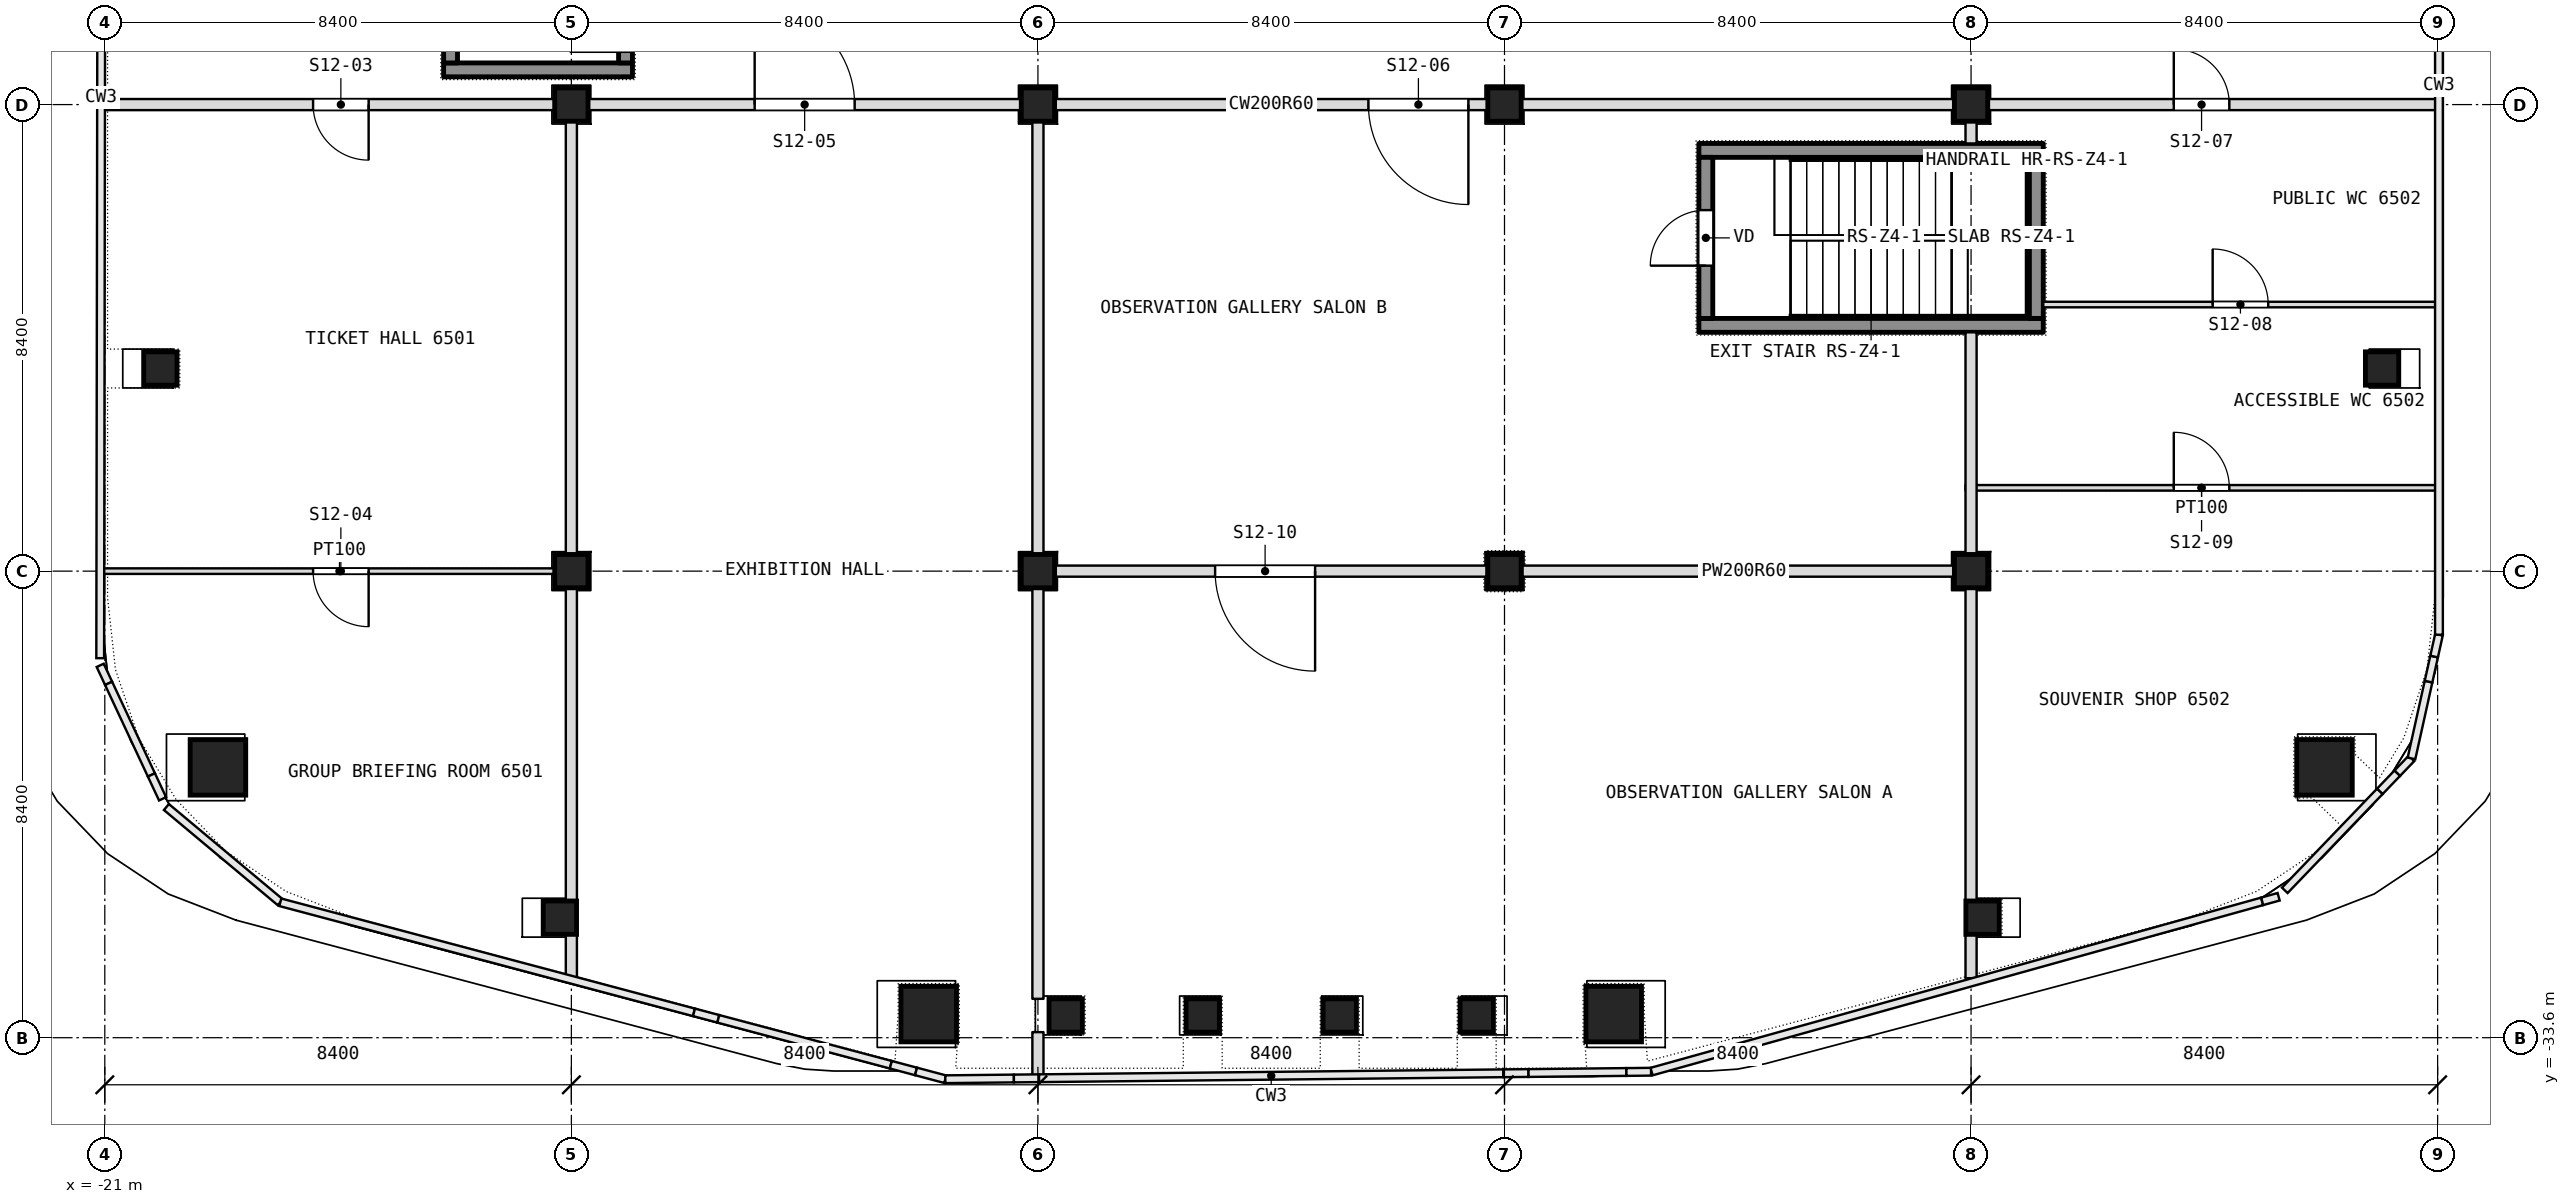
"""IFC4 building model, lengths in metres.
Left out: names, types, materials, properties, quantities, classifications, styles, units other than length and angle.
Written with IfcOpenShell. Run it as: python <this file> out.ifc"""

import sys

from ifc_helpers import new_model, si_unit, direction, frame, frame_2d, origin, origin_2d, place, context, subcontext, project, spatial, rectangle, extrude, element, fill, save


model = new_model("IFC4")
c1 = context("Model", 3, precision=1e-05, world=origin(), true_north=direction((0.0, 1.0)))
c2 = subcontext(c1, "Body", "Model", "MODEL_VIEW")
j1 = project(units=[si_unit("LENGTHUNIT", "METRE"), si_unit("PLANEANGLEUNIT", "RADIAN")], contexts=[c1])
p1 = place(None, origin())
s1 = spatial("IfcSite", under=j1, at=p1, CompositionType="ELEMENT")
p2 = place(p1, origin())
s2 = spatial("IfcBuilding", under=s1, at=p2, CompositionType="ELEMENT")
p3 = place(p2, frame((0.0, 0.0, 281.3)))
s3 = spatial("IfcBuildingStorey", under=s2, at=p3, CompositionType="ELEMENT", Elevation=281.3)
for number, where, z_axis, x_axis in (
    (1, (-18.963, -28.733, 0.0), (0.0, 0.0, 1.0), (1.0, 0.0, 0.0)),
    (2, (-6.166, -33.175, 0.0), (0.0, 0.0, 1.0), (1.0, 0.0, 0.0)),
    (3, (6.166, -33.175, 0.0), (0.0, 0.0, 1.0), (1.0, 0.0, 0.0)),
    (4, (18.963, -28.733, 0.0), (0.0, 0.0, 1.0), (1.0, 0.0, 0.0)),
):
    element("IfcColumn", number, at=place(p3, frame(where, z_axis=z_axis, x_axis=x_axis)), inside=s3, PredefinedType="COLUMN", context=c2, shape_type="SweptSolid", body=[
        extrude(rectangle(XDim=1.0, YDim=1.0, at=origin_2d()), origin(), (0.0, 0.0, 1.0), 7.2),
    ])
for number, where, z_axis, x_axis in (
    (5, (-12.6, -25.2, 0.0), (0.0, 0.0, 1.0), (1.0, 0.0, 0.0)),
    (6, (-12.6, -16.8, 0.0), (0.0, 0.0, 1.0), (1.0, 0.0, 0.0)),
    (7, (-4.2, -25.2, 0.0), (0.0, 0.0, 1.0), (1.0, 0.0, 0.0)),
    (8, (-4.2, -16.8, 0.0), (0.0, 0.0, 1.0), (1.0, 0.0, 0.0)),
    (9, (4.2, -25.2, 0.0), (0.0, 0.0, 1.0), (1.0, 0.0, 0.0)),
    (10, (4.2, -16.8, 0.0), (0.0, 0.0, 1.0), (1.0, 0.0, 0.0)),
    (11, (12.6, -25.2, 0.0), (0.0, 0.0, 1.0), (1.0, 0.0, 0.0)),
    (12, (12.6, -16.8, 0.0), (0.0, 0.0, 1.0), (1.0, 0.0, 0.0)),
    (13, (-20.0, -21.552, 0.0), (0.0, 0.0, 1.0), (1.0, 0.0, 0.0)),
    (14, (20.0, -21.552, 0.0), (0.0, 0.0, 1.0), (1.0, 0.0, 0.0)),
    (15, (12.807, -31.439, 0.0), (0.0, 0.0, 1.0), (1.0, 0.0, 0.0)),
    (16, (3.7, -33.2, 0.0), (0.0, 0.0, 1.0), (1.0, 0.0, 0.0)),
    (17, (1.233, -33.2, 0.0), (0.0, 0.0, 1.0), (1.0, 0.0, 0.0)),
    (18, (-1.233, -33.2, 0.0), (0.0, 0.0, 1.0), (1.0, 0.0, 0.0)),
    (19, (-3.7, -33.2, 0.0), (0.0, 0.0, 1.0), (1.0, 0.0, 0.0)),
    (20, (-12.807, -31.439, 0.0), (0.0, 0.0, 1.0), (1.0, 0.0, 0.0)),
):
    element("IfcColumn", number, at=place(p3, frame(where, z_axis=z_axis, x_axis=x_axis)), inside=s3, PredefinedType="COLUMN", context=c2, shape_type="SweptSolid", body=[
        extrude(rectangle(XDim=0.6, YDim=0.6, at=origin_2d()), origin(), (0.0, 0.0, 1.0), 7.2),
    ])
p4 = place(p3, frame((-21.05, -25.2, 0.0), z_axis=(0.0, 0.0, 1.0), x_axis=(1.0, 0.0, 0.0)))
e21 = element("IfcWall", 21, at=p4, inside=s3, PredefinedType="PARTITIONING", context=c2, shape_type="SweptSolid", body=[
    extrude(rectangle(XDim=8.55, YDim=0.1, at=frame_2d((4.275, 0.0))), origin(), (0.0, 0.0, 1.0), 6.6),
])
p5 = place(p4, frame((3.8, 0.0, 0.0)))
e22 = element("IfcOpeningElement", 22, at=p5, cuts=e21, PredefinedType="OPENING", context=c2, shape_type="SweptSolid", body=[
    extrude(rectangle(XDim=1.0, YDim=2.1, at=frame_2d((0.5, 1.05))), frame((0.0, 0.05, 0.0), z_axis=(0.0, -1.0, 0.0), x_axis=(1.0, 0.0, 0.0)), (0.0, 0.0, 1.0), 0.1),
])
p6 = place(p3, frame((-4.1, -25.2, 0.0), z_axis=(0.0, 0.0, 1.0), x_axis=(1.0, 0.0, 0.0)))
e23 = element("IfcWall", 23, at=p6, inside=s3, PredefinedType="PARTITIONING", context=c2, shape_type="SweptSolid", body=[
    extrude(rectangle(XDim=7.98, YDim=0.2, at=frame_2d((3.99, 0.0))), origin(), (0.0, 0.0, 1.0), 6.6),
])
p7 = place(p6, frame((3.09, 0.0, 0.0)))
e24 = element("IfcOpeningElement", 24, at=p7, cuts=e23, PredefinedType="OPENING", context=c2, shape_type="SweptSolid", body=[
    extrude(rectangle(XDim=1.8, YDim=2.1, at=frame_2d((0.9, 1.05))), frame((0.0, 0.1, 0.0), z_axis=(0.0, -1.0, 0.0), x_axis=(1.0, 0.0, 0.0)), (0.0, 0.0, 1.0), 0.2),
])
p8 = place(p3, frame((4.52, -25.2, 0.0), z_axis=(0.0, 0.0, 1.0), x_axis=(1.0, 0.0, 0.0)))
e25 = element("IfcWall", 25, at=p8, inside=s3, PredefinedType="PARTITIONING", context=c2, shape_type="SweptSolid", body=[
    extrude(rectangle(XDim=7.98, YDim=0.2, at=frame_2d((3.99, 0.0))), origin(), (0.0, 0.0, 1.0), 6.6),
])
p9 = place(p3, frame((12.5, -23.7, 0.0), z_axis=(0.0, 0.0, 1.0), x_axis=(1.0, 0.0, 0.0)))
e26 = element("IfcWall", 26, at=p9, inside=s3, PredefinedType="PARTITIONING", context=c2, shape_type="SweptSolid", body=[
    extrude(rectangle(XDim=8.5, YDim=0.1, at=frame_2d((4.25, 0.0))), origin(), (0.0, 0.0, 1.0), 6.94),
])
p10 = place(p9, frame((3.75, 0.0, 0.0)))
e27 = element("IfcOpeningElement", 27, at=p10, cuts=e26, PredefinedType="OPENING", context=c2, shape_type="SweptSolid", body=[
    extrude(rectangle(XDim=1.0, YDim=2.1, at=frame_2d((0.5, 1.05))), frame((0.0, 0.05, 0.0), z_axis=(0.0, -1.0, 0.0), x_axis=(1.0, 0.0, 0.0)), (0.0, 0.0, 1.0), 0.1),
])
p11 = place(p3, frame((13.9, -20.4, 0.0), z_axis=(0.0, 0.0, 1.0), x_axis=(1.0, 0.0, 0.0)))
e28 = element("IfcWall", 28, at=p11, inside=s3, PredefinedType="PARTITIONING", context=c2, shape_type="SweptSolid", body=[
    extrude(rectangle(XDim=7.1, YDim=0.1, at=frame_2d((3.55, 0.0))), origin(), (0.0, 0.0, 1.0), 6.94),
])
p12 = place(p11, frame((3.05, 0.0, 0.0)))
e29 = element("IfcOpeningElement", 29, at=p12, cuts=e28, PredefinedType="OPENING", context=c2, shape_type="SweptSolid", body=[
    extrude(rectangle(XDim=1.0, YDim=2.1, at=frame_2d((0.5, 1.05))), frame((0.0, 0.05, 0.0), z_axis=(0.0, -1.0, 0.0), x_axis=(1.0, 0.0, 0.0)), (0.0, 0.0, 1.0), 0.1),
])
p13 = place(p3, frame((-21.0, -16.8, 0.0), z_axis=(0.0, 0.0, 1.0), x_axis=(1.0, 0.0, 0.0)))
e30 = element("IfcWall", 30, at=p13, inside=s3, PredefinedType="PARTITIONING", context=c2, shape_type="SweptSolid", body=[
    extrude(rectangle(XDim=42.0, YDim=0.2, at=frame_2d((21.0, 0.0))), origin(), (0.0, 0.0, 1.0), 6.6),
])
p14 = place(p13, frame((3.75, 0.0, 0.0)))
e31 = element("IfcOpeningElement", 31, at=p14, cuts=e30, PredefinedType="OPENING", context=c2, shape_type="SweptSolid", body=[
    extrude(rectangle(XDim=1.0, YDim=2.1, at=frame_2d((0.5, 1.05))), frame((0.0, 0.1, 0.0), z_axis=(0.0, -1.0, 0.0), x_axis=(1.0, 0.0, 0.0)), (0.0, 0.0, 1.0), 0.2),
])
p15 = place(p13, frame((11.7, 0.0, 0.0)))
e32 = element("IfcOpeningElement", 32, at=p15, cuts=e30, PredefinedType="OPENING", context=c2, shape_type="SweptSolid", body=[
    extrude(rectangle(XDim=1.8, YDim=2.1, at=frame_2d((0.9, 1.05))), frame((0.0, 0.1, 0.0), z_axis=(0.0, -1.0, 0.0), x_axis=(1.0, 0.0, 0.0)), (0.0, 0.0, 1.0), 0.2),
])
p16 = place(p13, frame((22.75, 0.0, 0.0)))
e33 = element("IfcOpeningElement", 33, at=p16, cuts=e30, PredefinedType="OPENING", context=c2, shape_type="SweptSolid", body=[
    extrude(rectangle(XDim=1.8, YDim=2.1, at=frame_2d((0.9, 1.05))), frame((0.0, 0.1, 0.0), z_axis=(0.0, -1.0, 0.0), x_axis=(1.0, 0.0, 0.0)), (0.0, 0.0, 1.0), 0.2),
])
p17 = place(p13, frame((37.25, 0.0, 0.0)))
e34 = element("IfcOpeningElement", 34, at=p17, cuts=e30, PredefinedType="OPENING", context=c2, shape_type="SweptSolid", body=[
    extrude(rectangle(XDim=1.0, YDim=2.1, at=frame_2d((0.5, 1.05))), frame((0.0, 0.1, 0.0), z_axis=(0.0, -1.0, 0.0), x_axis=(1.0, 0.0, 0.0)), (0.0, 0.0, 1.0), 0.2),
])
p18 = place(p3, frame((12.6, -32.529, 0.0), z_axis=(0.0, 0.0, 1.0), x_axis=(0.0, 1.0, 0.0)))
e35 = element("IfcWall", 35, at=p18, inside=s3, PredefinedType="PARTITIONING", context=c2, shape_type="SweptSolid", body=[
    extrude(rectangle(XDim=0.79, YDim=0.2, at=frame_2d((0.395, 0.0))), origin(), (0.0, 0.0, 1.0), 6.94),
])
p19 = place(p3, frame((12.6, -31.139, 0.0), z_axis=(0.0, 0.0, 1.0), x_axis=(0.0, 1.0, 0.0)))
e36 = element("IfcWall", 36, at=p19, inside=s3, PredefinedType="PARTITIONING", context=c2, shape_type="SweptSolid", body=[
    extrude(rectangle(XDim=10.239, YDim=0.2, at=frame_2d((5.12, 0.0))), origin(), (0.0, 0.0, 1.0), 6.94),
])
p20 = place(p3, frame((12.6, -17.5, 0.0), z_axis=(0.0, 0.0, 1.0), x_axis=(0.0, 1.0, 0.0)))
e37 = element("IfcWall", 37, at=p20, inside=s3, PredefinedType="PARTITIONING", context=c2, shape_type="SweptSolid", body=[
    extrude(rectangle(XDim=0.6, YDim=0.2, at=frame_2d((0.3, 0.0))), origin(), (0.0, 0.0, 1.0), 6.94),
])
p21 = place(p3, frame((-4.2, -34.3, 0.0), z_axis=(0.0, 0.0, 1.0), x_axis=(0.0, 1.0, 0.0)))
e38 = element("IfcWall", 38, at=p21, inside=s3, PredefinedType="PARTITIONING", context=c2, shape_type="SweptSolid", body=[
    extrude(rectangle(XDim=0.8, YDim=0.2, at=frame_2d((0.4, 0.0))), origin(), (0.0, 0.0, 1.0), 6.94),
])
p22 = place(p3, frame((-4.2, -32.9, 0.0), z_axis=(0.0, 0.0, 1.0), x_axis=(0.0, 1.0, 0.0)))
e39 = element("IfcWall", 39, at=p22, inside=s3, PredefinedType="PARTITIONING", context=c2, shape_type="SweptSolid", body=[
    extrude(rectangle(XDim=16.0, YDim=0.2, at=frame_2d((8.0, 0.0))), origin(), (0.0, 0.0, 1.0), 6.94),
])
p23 = place(p3, frame((-12.6, -32.529, 0.0), z_axis=(0.0, 0.0, 1.0), x_axis=(0.0, 1.0, 0.0)))
e40 = element("IfcWall", 40, at=p23, inside=s3, PredefinedType="PARTITIONING", context=c2, shape_type="SweptSolid", body=[
    extrude(rectangle(XDim=15.629, YDim=0.2, at=frame_2d((7.814, 0.0))), origin(), (0.0, 0.0, 1.0), 6.94),
])
for number, where, z_axis, x_axis in (
    (41, (7.7, -20.775, 0.1), (0.0, 0.0, 1.0), (1.0, 0.0, 0.0)),
    (42, (7.7, -17.625, 0.1), (0.0, 0.0, 1.0), (1.0, 0.0, 0.0)),
):
    element("IfcWall", number, at=place(p3, frame(where, z_axis=z_axis, x_axis=x_axis)), inside=s3, PredefinedType="SHEAR", context=c2, shape_type="SweptSolid", body=[
        extrude(rectangle(XDim=6.2, YDim=0.25, at=frame_2d((3.1, 0.0))), origin(), (0.0, 0.0, 1.0), 7.2),
    ])
p24 = place(p3, frame((7.825, -20.65, 0.1), z_axis=(0.0, 0.0, 1.0), x_axis=(0.0, 1.0, 0.0)))
e43 = element("IfcWall", 43, at=p24, inside=s3, PredefinedType="SHEAR", context=c2, shape_type="SweptSolid", body=[
    extrude(rectangle(XDim=2.9, YDim=0.25, at=frame_2d((1.45, 0.0))), origin(), (0.0, 0.0, 1.0), 7.2),
])
p25 = place(p24, frame((0.95, 0.0, 0.0)))
e44 = element("IfcOpeningElement", 44, at=p25, cuts=e43, PredefinedType="OPENING", context=c2, shape_type="SweptSolid", body=[
    extrude(rectangle(XDim=1.0, YDim=2.1, at=frame_2d((0.5, 1.05))), frame((0.0, 0.125, 0.0), z_axis=(0.0, -1.0, 0.0), x_axis=(1.0, 0.0, 0.0)), (0.0, 0.0, 1.0), 0.25),
])
p26 = place(p3, frame((13.775, -20.65, 0.1), z_axis=(0.0, 0.0, 1.0), x_axis=(0.0, 1.0, 0.0)))
e45 = element("IfcWall", 45, at=p26, inside=s3, PredefinedType="SHEAR", context=c2, shape_type="SweptSolid", body=[
    extrude(rectangle(XDim=2.9, YDim=0.25, at=frame_2d((1.45, 0.0))), origin(), (0.0, 0.0, 1.0), 7.2),
])
p27 = place(p3, frame((-14.9, -16.175, 0.1), z_axis=(0.0, 0.0, 1.0), x_axis=(1.0, 0.0, 0.0)))
e46 = element("IfcWall", 46, at=p27, inside=s3, PredefinedType="SHEAR", context=c2, shape_type="SweptSolid", body=[
    extrude(rectangle(XDim=3.4, YDim=0.25, at=frame_2d((1.7, 0.0))), origin(), (0.0, 0.0, 1.0), 7.2),
])
p28 = place(p3, frame((-14.775, -16.05, 0.1), z_axis=(0.0, 0.0, 1.0), x_axis=(0.0, 1.0, 0.0)))
e47 = element("IfcWall", 47, at=p28, inside=s3, PredefinedType="SHEAR", context=c2, shape_type="SweptSolid", body=[
    extrude(rectangle(XDim=5.7, YDim=0.25, at=frame_2d((2.85, 0.0))), origin(), (0.0, 0.0, 1.0), 7.2),
])
p29 = place(p3, frame((-11.625, -16.05, 0.1), z_axis=(0.0, 0.0, 1.0), x_axis=(0.0, 1.0, 0.0)))
e48 = element("IfcWall", 48, at=p29, inside=s3, PredefinedType="SHEAR", context=c2, shape_type="SweptSolid", body=[
    extrude(rectangle(XDim=5.7, YDim=0.25, at=frame_2d((2.85, 0.0))), origin(), (0.0, 0.0, 1.0), 7.2),
])
p30 = place(p29, frame((0.2, 0.0, 0.0)))
e49 = element("IfcOpeningElement", 49, at=p30, cuts=e48, PredefinedType="OPENING", context=c2, shape_type="SweptSolid", body=[
    extrude(rectangle(XDim=1.0, YDim=2.1, at=frame_2d((0.5, 1.05))), frame((0.0, 0.125, 0.0), z_axis=(0.0, -1.0, 0.0), x_axis=(1.0, 0.0, 0.0)), (0.0, 0.0, 1.0), 0.25),
])
p31 = place(p5, origin())
e50 = element("IfcDoor", 50, at=p31, inside=s3, OperationType="SINGLE_SWING_RIGHT", PredefinedType="DOOR", context=c2, shape_type="SweptSolid", body=[
    extrude(rectangle(XDim=1.0, YDim=2.1, at=frame_2d((0.5, 1.05))), frame((0.0, 0.025, 0.0), z_axis=(0.0, -1.0, 0.0), x_axis=(1.0, 0.0, 0.0)), (0.0, 0.0, 1.0), 0.05),
])
fill(e22, e50)
p32 = place(p7, origin())
e51 = element("IfcDoor", 51, at=p32, inside=s3, OperationType="DOUBLE_DOOR_SINGLE_SWING", PredefinedType="DOOR", context=c2, shape_type="SweptSolid", body=[
    extrude(rectangle(XDim=1.8, YDim=2.1, at=frame_2d((0.9, 1.05))), frame((0.0, 0.025, 0.0), z_axis=(0.0, -1.0, 0.0), x_axis=(1.0, 0.0, 0.0)), (0.0, 0.0, 1.0), 0.05),
])
fill(e24, e51)
p33 = place(p10, origin())
e52 = element("IfcDoor", 52, at=p33, inside=s3, OperationType="SINGLE_SWING_LEFT", PredefinedType="DOOR", context=c2, shape_type="SweptSolid", body=[
    extrude(rectangle(XDim=1.0, YDim=2.1, at=frame_2d((0.5, 1.05))), frame((0.0, 0.025, 0.0), z_axis=(0.0, -1.0, 0.0), x_axis=(1.0, 0.0, 0.0)), (0.0, 0.0, 1.0), 0.05),
])
fill(e27, e52)
p34 = place(p12, origin())
e53 = element("IfcDoor", 53, at=p34, inside=s3, OperationType="SINGLE_SWING_LEFT", PredefinedType="DOOR", context=c2, shape_type="SweptSolid", body=[
    extrude(rectangle(XDim=1.0, YDim=2.1, at=frame_2d((0.5, 1.05))), frame((0.0, 0.025, 0.0), z_axis=(0.0, -1.0, 0.0), x_axis=(1.0, 0.0, 0.0)), (0.0, 0.0, 1.0), 0.05),
])
fill(e29, e53)
p35 = place(p14, origin())
e54 = element("IfcDoor", 54, at=p35, inside=s3, OperationType="SINGLE_SWING_LEFT", PredefinedType="DOOR", context=c2, shape_type="SweptSolid", body=[
    extrude(rectangle(XDim=1.0, YDim=2.1, at=frame_2d((0.5, 1.05))), frame((0.0, 0.025, 0.0), z_axis=(0.0, -1.0, 0.0), x_axis=(1.0, 0.0, 0.0)), (0.0, 0.0, 1.0), 0.05),
])
fill(e31, e54)
p36 = place(p15, origin())
e55 = element("IfcDoor", 55, at=p36, inside=s3, OperationType="DOUBLE_DOOR_SINGLE_SWING", PredefinedType="DOOR", context=c2, shape_type="SweptSolid", body=[
    extrude(rectangle(XDim=1.8, YDim=2.1, at=frame_2d((0.9, 1.05))), frame((0.0, 0.025, 0.0), z_axis=(0.0, -1.0, 0.0), x_axis=(1.0, 0.0, 0.0)), (0.0, 0.0, 1.0), 0.05),
])
fill(e32, e55)
p37 = place(p16, origin())
e56 = element("IfcDoor", 56, at=p37, inside=s3, OperationType="DOUBLE_DOOR_SINGLE_SWING", PredefinedType="DOOR", context=c2, shape_type="SweptSolid", body=[
    extrude(rectangle(XDim=1.8, YDim=2.1, at=frame_2d((0.9, 1.05))), frame((0.0, 0.025, 0.0), z_axis=(0.0, -1.0, 0.0), x_axis=(1.0, 0.0, 0.0)), (0.0, 0.0, 1.0), 0.05),
])
fill(e33, e56)
p38 = place(p17, origin())
e57 = element("IfcDoor", 57, at=p38, inside=s3, OperationType="SINGLE_SWING_LEFT", PredefinedType="DOOR", context=c2, shape_type="SweptSolid", body=[
    extrude(rectangle(XDim=1.0, YDim=2.1, at=frame_2d((0.5, 1.05))), frame((0.0, 0.025, 0.0), z_axis=(0.0, -1.0, 0.0), x_axis=(1.0, 0.0, 0.0)), (0.0, 0.0, 1.0), 0.05),
])
fill(e34, e57)
p39 = place(p25, origin())
e58 = element("IfcDoor", 58, at=p39, inside=s3, OperationType="SINGLE_SWING_LEFT", PredefinedType="DOOR", context=c2, shape_type="SweptSolid", body=[
    extrude(rectangle(XDim=1.0, YDim=2.1, at=frame_2d((0.5, 1.05))), frame((0.0, 0.025, 0.0), z_axis=(0.0, -1.0, 0.0), x_axis=(1.0, 0.0, 0.0)), (0.0, 0.0, 1.0), 0.05),
])
fill(e44, e58)
save(model, sys.argv[1])
